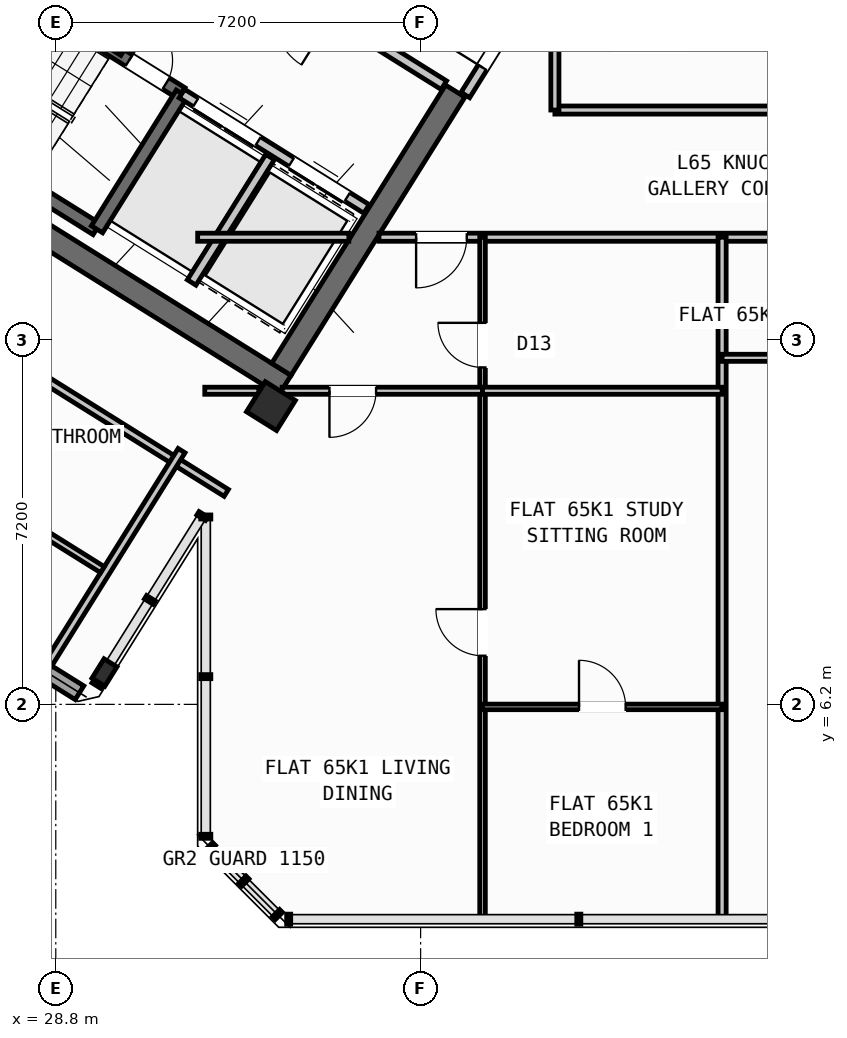
"""IFC4 building model, lengths in metres.
Left out: names, types, materials, properties, quantities, classifications, styles, units other than length and angle.
Written with IfcOpenShell. Run it as: python <this file> out.ifc"""

import sys

from ifc_helpers import new_model, si_unit, direction, frame, frame_2d, origin, origin_2d, place, context, subcontext, project, spatial, rectangle, hollow_rectangle, i_section, extrude, source, transform, mapped, element, fill, save


model = new_model("IFC4")
c1 = context("Model", 3, precision=1e-05, world=origin(), true_north=direction((0.0, 1.0)))
c2 = subcontext(c1, "Body", "Model", "MODEL_VIEW")
j1 = project(units=[si_unit("LENGTHUNIT", "METRE"), si_unit("PLANEANGLEUNIT", "RADIAN")], contexts=[c1])
p1 = place(None, origin())
s1 = spatial("IfcSite", under=j1, at=p1, CompositionType="ELEMENT")
p2 = place(p1, origin())
s2 = spatial("IfcBuilding", under=s1, at=p2, CompositionType="ELEMENT")
p3 = place(p2, frame((0.0, 0.0, 259.2)))
s3 = spatial("IfcBuildingStorey", under=s2, at=p3, CompositionType="ELEMENT", Elevation=259.2)
p4 = place(p3, frame((33.324, 12.503, 0.0), z_axis=(0.0, 0.0, 1.0), x_axis=(-0.848043529849, 0.529926571782, 0.0)))
e1 = element("IfcWall", 1, at=p4, inside=s3, PredefinedType="SHEAR", context=c2, shape_type="SweptSolid", body=[
    extrude(rectangle(XDim=13.04, YDim=0.45, at=frame_2d((6.52, 0.0))), origin(), (0.0, 0.0, 1.0), 3.35),
])
p5 = place(p3, frame((36.683, 18.304, 0.0), z_axis=(0.0, 0.0, 1.0), x_axis=(-0.529904039071, -0.848057609704, 0.0)))
e2 = element("IfcWall", 2, at=p5, inside=s3, PredefinedType="SHEAR", context=c2, shape_type="SweptSolid", body=[
    extrude(rectangle(XDim=6.475, YDim=0.45, at=frame_2d((3.238, 0.0))), origin(), (0.0, 0.0, 1.0), 3.35),
])
m1 = source(origin(), c2, "Body", "SweptSolid", [
    extrude(hollow_rectangle(XDim=0.7, YDim=0.7, WallThickness=0.028, at=origin_2d()), origin(), (0.0, 0.0, 1.0), 3.6),
])
p6 = place(p3, frame((33.046, 12.087, 0.0), z_axis=(0.0, 0.0, 1.0), x_axis=(-0.848048096156, 0.529919264233, 0.0)))
e3 = element("IfcColumn", 3, at=p6, inside=s3, PredefinedType="COLUMN", context=c2, shape_type="MappedRepresentation", body=[
    mapped(m1, transform((0.0, 0.0, 0.0), scale=1.0)),
])
m2 = source(origin(), c2, "Body", "SweptSolid", [
    extrude(i_section(OverallWidth=0.3, OverallDepth=0.45, WebThickness=0.014, FlangeThickness=0.026, at=origin_2d()), origin(), (0.0, 0.0, 1.0), 3.6),
])
p7 = place(p3, frame((29.761, 6.829, 0.0), z_axis=(0.0, 0.0, 1.0), x_axis=(-0.848048096156, 0.529919264233, 0.0)))
e4 = element("IfcColumn", 4, at=p7, inside=s3, PredefinedType="COLUMN", context=c2, shape_type="MappedRepresentation", body=[
    mapped(m2, transform((0.0, 0.0, 0.0), scale=1.0)),
])
p8 = place(p3, frame((29.268, 6.429, 0.0), z_axis=(0.0, 0.0, 1.0), x_axis=(-0.848049971435, 0.529916263149, 0.0)))
e5 = element("IfcWall", 5, at=p8, inside=s3, PredefinedType="STANDARD", context=c2, shape_type="SweptSolid", body=[
    extrude(rectangle(XDim=31.588, YDim=0.32, at=frame_2d((15.794, 0.0))), origin(), (0.0, 0.0, 1.0), 3.35),
])
p9 = place(p8, frame((16.362, 0.0, 0.0)))
e6 = element("IfcOpeningElement", 6, at=p9, cuts=e5, PredefinedType="OPENING", context=c2, shape_type="SweptSolid", body=[
    extrude(rectangle(XDim=1.2, YDim=2.15, at=frame_2d((0.6, 1.075))), frame((0.0, 0.17, 0.0), z_axis=(0.0, -1.0, 0.0), x_axis=(1.0, 0.0, 0.0)), (0.0, 0.0, 1.0), 0.34),
])
p10 = place(p8, frame((3.859, 0.0, 0.9)))
e7 = element("IfcOpeningElement", 7, at=p10, cuts=e5, PredefinedType="OPENING", context=c2, shape_type="SweptSolid", body=[
    extrude(rectangle(XDim=1.65, YDim=1.45, at=frame_2d((0.825, 0.725))), frame((0.0, 0.17, 0.0), z_axis=(0.0, -1.0, 0.0), x_axis=(1.0, 0.0, 0.0)), (0.0, 0.0, 1.0), 0.34),
])
p11 = place(p8, frame((10.519, 0.0, 0.9)))
e8 = element("IfcOpeningElement", 8, at=p11, cuts=e5, PredefinedType="OPENING", context=c2, shape_type="SweptSolid", body=[
    extrude(rectangle(XDim=1.65, YDim=1.45, at=frame_2d((0.825, 0.725))), frame((0.0, 0.17, 0.0), z_axis=(0.0, -1.0, 0.0), x_axis=(1.0, 0.0, 0.0)), (0.0, 0.0, 1.0), 0.34),
])
p12 = place(p8, frame((28.413, 0.0, 0.95)))
e9 = element("IfcOpeningElement", 9, at=p12, cuts=e5, PredefinedType="OPENING", context=c2, shape_type="SweptSolid", body=[
    extrude(rectangle(XDim=1.95, YDim=1.35, at=frame_2d((0.975, 0.675))), frame((0.0, 0.17, 0.0), z_axis=(0.0, -1.0, 0.0), x_axis=(1.0, 0.0, 0.0)), (0.0, 0.0, 1.0), 0.34),
])
p13 = place(p8, frame((19.699, 0.0, 1.0)))
e10 = element("IfcOpeningElement", 10, at=p13, cuts=e5, PredefinedType="OPENING", context=c2, shape_type="SweptSolid", body=[
    extrude(rectangle(XDim=0.65, YDim=1.15, at=frame_2d((0.325, 0.575))), frame((0.0, 0.17, 0.0), z_axis=(0.0, -1.0, 0.0), x_axis=(1.0, 0.0, 0.0)), (0.0, 0.0, 1.0), 0.34),
])
p14 = place(p8, frame((21.721, 0.0, 1.0)))
e11 = element("IfcOpeningElement", 11, at=p14, cuts=e5, PredefinedType="OPENING", context=c2, shape_type="SweptSolid", body=[
    extrude(rectangle(XDim=0.65, YDim=1.15, at=frame_2d((0.325, 0.575))), frame((0.0, 0.17, 0.0), z_axis=(0.0, -1.0, 0.0), x_axis=(1.0, 0.0, 0.0)), (0.0, 0.0, 1.0), 0.34),
])
p15 = place(p8, frame((23.756, 0.0, 1.0)))
e12 = element("IfcOpeningElement", 12, at=p15, cuts=e5, PredefinedType="OPENING", context=c2, shape_type="SweptSolid", body=[
    extrude(rectangle(XDim=0.65, YDim=1.15, at=frame_2d((0.325, 0.575))), frame((0.0, 0.17, 0.0), z_axis=(0.0, -1.0, 0.0), x_axis=(1.0, 0.0, 0.0)), (0.0, 0.0, 1.0), 0.34),
])
p16 = place(p8, frame((25.791, 0.0, 1.0)))
e13 = element("IfcOpeningElement", 13, at=p16, cuts=e5, PredefinedType="OPENING", context=c2, shape_type="SweptSolid", body=[
    extrude(rectangle(XDim=0.65, YDim=1.15, at=frame_2d((0.325, 0.575))), frame((0.0, 0.17, 0.0), z_axis=(0.0, -1.0, 0.0), x_axis=(1.0, 0.0, 0.0)), (0.0, 0.0, 1.0), 0.34),
])
p17 = place(p3, frame((29.605, 15.581, 0.0), z_axis=(0.0, 0.0, 1.0), x_axis=(-0.848036911448, 0.529937163087, 0.0)))
e14 = element("IfcWall", 14, at=p17, inside=s3, PredefinedType="SHEAR", context=c2, shape_type="SweptSolid", body=[
    extrude(rectangle(XDim=7.46, YDim=0.26, at=frame_2d((3.73, 0.0))), origin(), (0.0, 0.0, 1.0), 3.35),
])
p18 = place(p3, frame((31.28, 18.261, 0.0), z_axis=(0.0, 0.0, 1.0), x_axis=(-0.848051618787, 0.529913626805, 0.0)))
e15 = element("IfcWall", 15, at=p18, inside=s3, PredefinedType="SHEAR", context=c2, shape_type="SweptSolid", body=[
    extrude(rectangle(XDim=7.46, YDim=0.26, at=frame_2d((3.73, 0.0))), origin(), (0.0, 0.0, 1.0), 3.35),
])
p19 = place(p18, frame((0.36, 0.0, 0.0)))
e16 = element("IfcOpeningElement", 16, at=p19, cuts=e15, PredefinedType="OPENING", context=c2, shape_type="SweptSolid", body=[
    extrude(rectangle(XDim=0.86, YDim=2.05, at=frame_2d((0.43, 1.025))), frame((0.0, 0.14, 0.0), z_axis=(0.0, -1.0, 0.0), x_axis=(1.0, 0.0, 0.0)), (0.0, 0.0, 1.0), 0.28),
])
p20 = place(p3, frame((31.288, 18.256, 0.0), z_axis=(0.0, 0.0, 1.0), x_axis=(-0.529943379326, -0.848033026897, 0.0)))
e17 = element("IfcWall", 17, at=p20, inside=s3, PredefinedType="SHEAR", context=c2, shape_type="SweptSolid", body=[
    extrude(rectangle(XDim=3.16, YDim=0.26, at=frame_2d((1.58, 0.0))), origin(), (0.0, 0.0, 1.0), 3.35),
])
p21 = place(p3, frame((34.933, 15.978, 0.0), z_axis=(0.0, 0.0, 1.0), x_axis=(-0.848055739377, 0.529907032327, 0.0)))
e18 = element("IfcWall", 18, at=p21, inside=s3, PredefinedType="STANDARD", context=c2, shape_type="SweptSolid", body=[
    extrude(rectangle(XDim=4.298, YDim=0.2, at=frame_2d((2.149, 0.0))), origin(), (0.0, 0.0, 1.0), 3.34),
])
p22 = place(p21, frame((0.448, 0.0, 0.0)))
e19 = element("IfcOpeningElement", 19, at=p22, cuts=e18, PredefinedType="OPENING", context=c2, shape_type="SweptSolid", body=[
    extrude(rectangle(XDim=1.3, YDim=2.2, at=frame_2d((0.65, 1.1))), frame((0.0, 0.11, 0.0), z_axis=(0.0, -1.0, 0.0), x_axis=(1.0, 0.0, 0.0)), (0.0, 0.0, 1.0), 0.22),
])
p23 = place(p21, frame((2.523, 0.0, 0.0)))
e20 = element("IfcOpeningElement", 20, at=p23, cuts=e18, PredefinedType="OPENING", context=c2, shape_type="SweptSolid", body=[
    extrude(rectangle(XDim=1.45, YDim=2.25, at=frame_2d((0.725, 1.125))), frame((0.0, 0.11, 0.0), z_axis=(0.0, -1.0, 0.0), x_axis=(1.0, 0.0, 0.0)), (0.0, 0.0, 1.0), 0.22),
])
p24 = place(p3, frame((36.459, 18.421, 0.0), z_axis=(0.0, 0.0, 1.0), x_axis=(-0.848059591691, 0.529900867089, 0.0)))
e21 = element("IfcWall", 21, at=p24, inside=s3, PredefinedType="STANDARD", context=c2, shape_type="SweptSolid", body=[
    extrude(rectangle(XDim=5.818, YDim=0.2, at=frame_2d((2.909, 0.0))), origin(), (0.0, 0.0, 1.0), 3.34),
])
p25 = place(p24, frame((2.598, 0.0, 0.0)))
e22 = element("IfcOpeningElement", 22, at=p25, cuts=e21, PredefinedType="OPENING", context=c2, shape_type="SweptSolid", body=[
    extrude(rectangle(XDim=1.15, YDim=2.1, at=frame_2d((0.575, 1.05))), frame((0.0, 0.11, 0.0), z_axis=(0.0, -1.0, 0.0), x_axis=(1.0, 0.0, 0.0)), (0.0, 0.0, 1.0), 0.22),
])
p26 = place(p3, frame((33.029, 17.003, 0.0), z_axis=(0.0, 0.0, 1.0), x_axis=(-0.529916267533, -0.848049968695, 0.0)))
e23 = element("IfcWall", 23, at=p26, inside=s3, PredefinedType="STANDARD", context=c2, shape_type="SweptSolid", body=[
    extrude(rectangle(XDim=2.92, YDim=0.2, at=frame_2d((1.46, 0.0))), origin(), (0.0, 0.0, 1.0), 3.34),
])
p27 = place(p3, frame((31.525, 21.504, 0.0), z_axis=(0.0, 0.0, 1.0), x_axis=(-0.529907497854, -0.848055448493, 0.0)))
e24 = element("IfcWall", 24, at=p27, inside=s3, PredefinedType="STANDARD", context=c2, shape_type="SweptSolid", body=[
    extrude(rectangle(XDim=2.88, YDim=0.2, at=frame_2d((1.44, 0.0))), origin(), (0.0, 0.0, 1.0), 3.34),
])
p28 = place(p3, frame((32.164, 10.374, 0.0), z_axis=(0.0, 0.0, 1.0), x_axis=(-0.848044107957, 0.529925646633, 0.0)))
e25 = element("IfcWall", 25, at=p28, inside=s3, PredefinedType="PARTITIONING", context=c2, shape_type="SweptSolid", body=[
    extrude(rectangle(XDim=15.57, YDim=0.16, at=frame_2d((7.785, 0.0))), origin(), (0.0, 0.0, 1.0), 3.34),
])
p29 = place(p28, frame((10.83, 0.0, 0.0)))
e26 = element("IfcOpeningElement", 26, at=p29, cuts=e25, PredefinedType="OPENING", context=c2, shape_type="SweptSolid", body=[
    extrude(rectangle(XDim=1.0, YDim=2.1, at=frame_2d((0.5, 1.05))), frame((0.0, 0.09, 0.0), z_axis=(0.0, -1.0, 0.0), x_axis=(1.0, 0.0, 0.0)), (0.0, 0.0, 1.0), 0.18),
])
p30 = place(p3, frame((31.282, 11.208, 0.0), z_axis=(0.0, 0.0, 1.0), x_axis=(-0.529938869374, -0.84803584519, 0.0)))
e27 = element("IfcWall", 27, at=p30, inside=s3, PredefinedType="PARTITIONING", context=c2, shape_type="SweptSolid", body=[
    extrude(rectangle(XDim=5.48, YDim=0.16, at=frame_2d((2.74, 0.0))), origin(), (0.0, 0.0, 1.0), 3.34),
])
p31 = place(p3, frame((29.72, 8.859, 0.0), z_axis=(0.0, 0.0, 1.0), x_axis=(-0.848049134363, 0.529917602752, 0.0)))
e28 = element("IfcWall", 28, at=p31, inside=s3, PredefinedType="PLUMBINGWALL", context=c2, shape_type="SweptSolid", body=[
    extrude(rectangle(XDim=14.3, YDim=0.14, at=frame_2d((7.15, 0.0))), origin(), (0.0, 0.0, 1.0), 3.34),
])
p32 = place(p31, frame((9.57, 0.0, 0.0)))
e29 = element("IfcOpeningElement", 29, at=p32, cuts=e28, PredefinedType="OPENING", context=c2, shape_type="SweptSolid", body=[
    extrude(rectangle(XDim=0.92, YDim=2.08, at=frame_2d((0.46, 1.04))), frame((0.0, 0.08, 0.0), z_axis=(0.0, -1.0, 0.0), x_axis=(1.0, 0.0, 0.0)), (0.0, 0.0, 1.0), 0.16),
])
p33 = place(p3, frame((38.451, 20.737, 0.0), z_axis=(0.0, 0.0, 1.0), x_axis=(-0.529924799939, -0.848044637038, 0.0)))
e30 = element("IfcWall", 30, at=p33, inside=s3, PredefinedType="STANDARD", context=c2, shape_type="SweptSolid", body=[
    extrude(rectangle(XDim=2.96, YDim=0.2, at=frame_2d((1.48, 0.0))), origin(), (0.0, 0.0, 1.0), 3.34),
])
p34 = place(p33, frame((1.46, 0.0, 0.0)))
e31 = element("IfcOpeningElement", 31, at=p34, cuts=e30, PredefinedType="OPENING", context=c2, shape_type="SweptSolid", body=[
    extrude(rectangle(XDim=0.86, YDim=2.05, at=frame_2d((0.43, 1.025))), frame((0.0, 0.11, 0.0), z_axis=(0.0, -1.0, 0.0), x_axis=(1.0, 0.0, 0.0)), (0.0, 0.0, 1.0), 0.22),
])
p35 = place(p3, frame((31.6, 15.42, 0.0), z_axis=(0.0, 0.0, 1.0), x_axis=(1.0, 0.0, 0.0)))
e32 = element("IfcWall", 32, at=p35, inside=s3, PredefinedType="PARTITIONING", context=c2, shape_type="SweptSolid", body=[
    extrude(rectangle(XDim=2.984, YDim=0.16, at=frame_2d((1.492, 0.0))), origin(), (0.0, 0.0, 1.0), 3.34),
])
p36 = place(p3, frame((35.178, 15.42, 0.0), z_axis=(0.0, 0.0, 1.0), x_axis=(1.0, 0.0, 0.0)))
e33 = element("IfcWall", 33, at=p36, inside=s3, PredefinedType="PARTITIONING", context=c2, shape_type="SweptSolid", body=[
    extrude(rectangle(XDim=15.552, YDim=0.16, at=frame_2d((7.776, 0.0))), origin(), (0.0, 0.0, 1.0), 3.34),
])
p37 = place(p36, frame((0.733, 0.0, 0.0)))
e34 = element("IfcOpeningElement", 34, at=p37, cuts=e33, PredefinedType="OPENING", context=c2, shape_type="SweptSolid", body=[
    extrude(rectangle(XDim=1.0, YDim=2.1, at=frame_2d((0.5, 1.05))), frame((0.0, 0.09, 0.0), z_axis=(0.0, -1.0, 0.0), x_axis=(1.0, 0.0, 0.0)), (0.0, 0.0, 1.0), 0.18),
])
p38 = place(p36, frame((9.153, 0.0, 0.0)))
e35 = element("IfcOpeningElement", 35, at=p38, cuts=e33, PredefinedType="OPENING", context=c2, shape_type="SweptSolid", body=[
    extrude(rectangle(XDim=1.0, YDim=2.1, at=frame_2d((0.5, 1.05))), frame((0.0, 0.09, 0.0), z_axis=(0.0, -1.0, 0.0), x_axis=(1.0, 0.0, 0.0)), (0.0, 0.0, 1.0), 0.18),
])
p39 = place(p3, frame((38.65, 17.93, 0.0), z_axis=(0.0, 0.0, 1.0), x_axis=(1.0, 0.0, 0.0)))
e36 = element("IfcWall", 36, at=p39, inside=s3, PredefinedType="PARTITIONING", context=c2, shape_type="SweptSolid", body=[
    extrude(rectangle(XDim=9.95, YDim=0.16, at=frame_2d((4.975, 0.0))), origin(), (0.0, 0.0, 1.0), 3.34),
])
p40 = place(p39, frame((4.475, 0.0, 0.0)))
e37 = element("IfcOpeningElement", 37, at=p40, cuts=e36, PredefinedType="OPENING", context=c2, shape_type="SweptSolid", body=[
    extrude(rectangle(XDim=1.0, YDim=2.1, at=frame_2d((0.5, 1.05))), frame((0.0, 0.09, 0.0), z_axis=(0.0, -1.0, 0.0), x_axis=(1.0, 0.0, 0.0)), (0.0, 0.0, 1.0), 0.18),
])
p41 = place(p3, frame((38.65, 17.93, 0.0), z_axis=(0.0, 0.0, 1.0), x_axis=(0.0, 1.0, 0.0)))
e38 = element("IfcWall", 38, at=p41, inside=s3, PredefinedType="PARTITIONING", context=c2, shape_type="SweptSolid", body=[
    extrude(rectangle(XDim=3.046, YDim=0.16, at=frame_2d((1.523, 0.0))), origin(), (0.0, 0.0, 1.0), 3.34),
])
p42 = place(p3, frame((41.95, 1.96, 0.0), z_axis=(0.0, 0.0, 1.0), x_axis=(0.0, 1.0, 0.0)))
e39 = element("IfcWall", 39, at=p42, inside=s3, PredefinedType="PARTITIONING", context=c2, shape_type="SweptSolid", body=[
    extrude(rectangle(XDim=13.46, YDim=0.16, at=frame_2d((6.73, 0.0))), origin(), (0.0, 0.0, 1.0), 3.34),
])
p43 = place(p3, frame((37.222, 1.96, 0.0), z_axis=(0.0, 0.0, 1.0), x_axis=(0.0, 1.0, 0.0)))
e40 = element("IfcWall", 40, at=p43, inside=s3, PredefinedType="PARTITIONING", context=c2, shape_type="SweptSolid", body=[
    extrude(rectangle(XDim=13.46, YDim=0.11, at=frame_2d((6.73, 0.0))), origin(), (0.0, 0.0, 1.0), 3.34),
])
p44 = place(p43, frame((5.2, 0.0, 0.0)))
e41 = element("IfcOpeningElement", 41, at=p44, cuts=e40, PredefinedType="OPENING", context=c2, shape_type="SweptSolid", body=[
    extrude(rectangle(XDim=0.92, YDim=2.08, at=frame_2d((0.46, 1.04))), frame((0.0, 0.065, 0.0), z_axis=(0.0, -1.0, 0.0), x_axis=(1.0, 0.0, 0.0)), (0.0, 0.0, 1.0), 0.13),
])
p45 = place(p43, frame((10.89, 0.0, 0.0)))
e42 = element("IfcOpeningElement", 42, at=p45, cuts=e40, PredefinedType="OPENING", context=c2, shape_type="SweptSolid", body=[
    extrude(rectangle(XDim=0.88, YDim=2.08, at=frame_2d((0.44, 1.04))), frame((0.0, 0.065, 0.0), z_axis=(0.0, -1.0, 0.0), x_axis=(1.0, 0.0, 0.0)), (0.0, 0.0, 1.0), 0.13),
])
p46 = place(p3, frame((31.74, 12.39, 0.0), z_axis=(0.0, 0.0, 1.0), x_axis=(1.0, 0.0, 0.0)))
e43 = element("IfcWall", 43, at=p46, inside=s3, PredefinedType="PLUMBINGWALL", context=c2, shape_type="SweptSolid", body=[
    extrude(rectangle(XDim=1.069, YDim=0.14, at=frame_2d((0.534, 0.0))), origin(), (0.0, 0.0, 1.0), 3.34),
])
p47 = place(p3, frame((33.267, 12.39, 0.0), z_axis=(0.0, 0.0, 1.0), x_axis=(1.0, 0.0, 0.0)))
e44 = element("IfcWall", 44, at=p47, inside=s3, PredefinedType="PLUMBINGWALL", context=c2, shape_type="SweptSolid", body=[
    extrude(rectangle(XDim=3.955, YDim=0.14, at=frame_2d((1.977, 0.0))), origin(), (0.0, 0.0, 1.0), 3.34),
])
p48 = place(p47, frame((0.934, 0.0, 0.0)))
e45 = element("IfcOpeningElement", 45, at=p48, cuts=e44, PredefinedType="OPENING", context=c2, shape_type="SweptSolid", body=[
    extrude(rectangle(XDim=0.92, YDim=2.08, at=frame_2d((0.46, 1.04))), frame((0.0, 0.08, 0.0), z_axis=(0.0, -1.0, 0.0), x_axis=(1.0, 0.0, 0.0)), (0.0, 0.0, 1.0), 0.16),
])
p49 = place(p3, frame((37.222, 12.39, 0.0), z_axis=(0.0, 0.0, 1.0), x_axis=(1.0, 0.0, 0.0)))
e46 = element("IfcWall", 46, at=p49, inside=s3, PredefinedType="PLUMBINGWALL", context=c2, shape_type="SweptSolid", body=[
    extrude(rectangle(XDim=4.728, YDim=0.14, at=frame_2d((2.364, 0.0))), origin(), (0.0, 0.0, 1.0), 3.34),
])
p50 = place(p3, frame((37.222, 6.15, 0.0), z_axis=(0.0, 0.0, 1.0), x_axis=(1.0, 0.0, 0.0)))
e47 = element("IfcWall", 47, at=p50, inside=s3, PredefinedType="PARTITIONING", context=c2, shape_type="SweptSolid", body=[
    extrude(rectangle(XDim=4.728, YDim=0.11, at=frame_2d((2.364, 0.0))), origin(), (0.0, 0.0, 1.0), 3.34),
])
p51 = place(p50, frame((1.904, 0.0, 0.0)))
e48 = element("IfcOpeningElement", 48, at=p51, cuts=e47, PredefinedType="OPENING", context=c2, shape_type="SweptSolid", body=[
    extrude(rectangle(XDim=0.92, YDim=2.08, at=frame_2d((0.46, 1.04))), frame((0.0, 0.065, 0.0), z_axis=(0.0, -1.0, 0.0), x_axis=(1.0, 0.0, 0.0)), (0.0, 0.0, 1.0), 0.13),
])
p52 = place(p3, frame((41.95, 13.04, 0.0), z_axis=(0.0, 0.0, 1.0), x_axis=(1.0, 0.0, 0.0)))
e49 = element("IfcWall", 49, at=p52, inside=s3, PredefinedType="PLUMBINGWALL", context=c2, shape_type="SweptSolid", body=[
    extrude(rectangle(XDim=5.713, YDim=0.14, at=frame_2d((2.856, 0.0))), origin(), (0.0, 0.0, 1.0), 3.34),
])
p53 = place(p52, frame((2.396, 0.0, 0.0)))
e50 = element("IfcOpeningElement", 50, at=p53, cuts=e49, PredefinedType="OPENING", context=c2, shape_type="SweptSolid", body=[
    extrude(rectangle(XDim=0.92, YDim=2.08, at=frame_2d((0.46, 1.04))), frame((0.0, 0.08, 0.0), z_axis=(0.0, -1.0, 0.0), x_axis=(1.0, 0.0, 0.0)), (0.0, 0.0, 1.0), 0.16),
])
m3 = source(origin(), c2, "Body", "SweptSolid", [
    extrude(rectangle(XDim=0.86, YDim=2.05, at=frame_2d((0.43, 1.025))), frame((0.0, 0.025, 0.0), z_axis=(0.0, -1.0, 0.0), x_axis=(1.0, 0.0, 0.0)), (0.0, 0.0, 1.0), 0.05),
])
p54 = place(p19, frame((0.86, 0.0, 0.0), z_axis=(0.0, 0.0, 1.0), x_axis=(-1.0, 0.0, 0.0)))
e51 = element("IfcDoor", 51, at=p54, inside=s3, OperationType="SINGLE_SWING_LEFT", PredefinedType="DOOR", context=c2, shape_type="MappedRepresentation", body=[
    mapped(m3, transform((0.0, 0.0, 0.0), scale=1.0)),
])
fill(e16, e51)
m4 = source(origin(), c2, "Body", "SweptSolid", [
    extrude(rectangle(XDim=1.3, YDim=2.2, at=frame_2d((0.65, 1.1))), frame((0.0, 0.025, 0.0), z_axis=(0.0, -1.0, 0.0), x_axis=(1.0, 0.0, 0.0)), (0.0, 0.0, 1.0), 0.05),
])
p55 = place(p22, origin())
e52 = element("IfcDoor", 52, at=p55, inside=s3, OperationType="DOUBLE_DOOR_SLIDING", PredefinedType="DOOR", context=c2, shape_type="MappedRepresentation", body=[
    mapped(m4, transform((0.0, 0.0, 0.0), scale=1.0)),
])
fill(e19, e52)
m5 = source(origin(), c2, "Body", "SweptSolid", [
    extrude(rectangle(XDim=1.45, YDim=2.25, at=frame_2d((0.725, 1.125))), frame((0.0, 0.025, 0.0), z_axis=(0.0, -1.0, 0.0), x_axis=(1.0, 0.0, 0.0)), (0.0, 0.0, 1.0), 0.05),
])
p56 = place(p23, origin())
e53 = element("IfcDoor", 53, at=p56, inside=s3, OperationType="DOUBLE_DOOR_SLIDING", PredefinedType="DOOR", context=c2, shape_type="MappedRepresentation", body=[
    mapped(m5, transform((0.0, 0.0, 0.0), scale=1.0)),
])
fill(e20, e53)
p57 = place(p34, frame((0.86, 0.0, 0.0), z_axis=(0.0, 0.0, 1.0), x_axis=(-1.0, 0.0, 0.0)))
e54 = element("IfcDoor", 54, at=p57, inside=s3, OperationType="SINGLE_SWING_LEFT", PredefinedType="DOOR", context=c2, shape_type="MappedRepresentation", body=[
    mapped(m3, transform((0.0, 0.0, 0.0), scale=1.0)),
])
fill(e31, e54)
m6 = source(origin(), c2, "Body", "SweptSolid", [
    extrude(rectangle(XDim=0.92, YDim=2.08, at=frame_2d((0.46, 1.04))), frame((0.0, 0.025, 0.0), z_axis=(0.0, -1.0, 0.0), x_axis=(1.0, 0.0, 0.0)), (0.0, 0.0, 1.0), 0.05),
])
p58 = place(p44, origin())
e55 = element("IfcDoor", 55, at=p58, inside=s3, OperationType="SINGLE_SWING_RIGHT", PredefinedType="DOOR", context=c2, shape_type="MappedRepresentation", body=[
    mapped(m6, transform((0.0, 0.0, 0.0), scale=1.0)),
])
fill(e41, e55)
p59 = place(p51, origin())
e56 = element("IfcDoor", 56, at=p59, inside=s3, OperationType="SINGLE_SWING_LEFT", PredefinedType="DOOR", context=c2, shape_type="MappedRepresentation", body=[
    mapped(m6, transform((0.0, 0.0, 0.0), scale=1.0)),
])
fill(e48, e56)
m7 = source(origin(), c2, "Body", "SweptSolid", [
    extrude(rectangle(XDim=1.0, YDim=2.1, at=frame_2d((0.5, 1.05))), frame((0.0, 0.025, 0.0), z_axis=(0.0, -1.0, 0.0), x_axis=(1.0, 0.0, 0.0)), (0.0, 0.0, 1.0), 0.05),
])
p60 = place(p37, frame((1.0, 0.0, 0.0), z_axis=(0.0, 0.0, 1.0), x_axis=(-1.0, 0.0, 0.0)))
e57 = element("IfcDoor", 57, at=p60, inside=s3, OperationType="SINGLE_SWING_RIGHT", PredefinedType="DOOR", context=c2, shape_type="MappedRepresentation", body=[
    mapped(m7, transform((0.0, 0.0, 0.0), scale=1.0)),
])
fill(e34, e57)
p61 = place(p48, frame((0.92, 0.0, 0.0), z_axis=(0.0, 0.0, 1.0), x_axis=(-1.0, 0.0, 0.0)))
e58 = element("IfcDoor", 58, at=p61, inside=s3, OperationType="SINGLE_SWING_RIGHT", PredefinedType="DOOR", context=c2, shape_type="MappedRepresentation", body=[
    mapped(m6, transform((0.0, 0.0, 0.0), scale=1.0)),
])
fill(e45, e58)
m8 = source(origin(), c2, "Body", "SweptSolid", [
    extrude(rectangle(XDim=0.88, YDim=2.08, at=frame_2d((0.44, 1.04))), frame((0.0, 0.025, 0.0), z_axis=(0.0, -1.0, 0.0), x_axis=(1.0, 0.0, 0.0)), (0.0, 0.0, 1.0), 0.05),
])
p62 = place(p45, origin())
e59 = element("IfcDoor", 59, at=p62, inside=s3, OperationType="SINGLE_SWING_RIGHT", PredefinedType="DOOR", context=c2, shape_type="MappedRepresentation", body=[
    mapped(m8, transform((0.0, 0.0, 0.0), scale=1.0)),
])
fill(e42, e59)
save(model, sys.argv[1])
